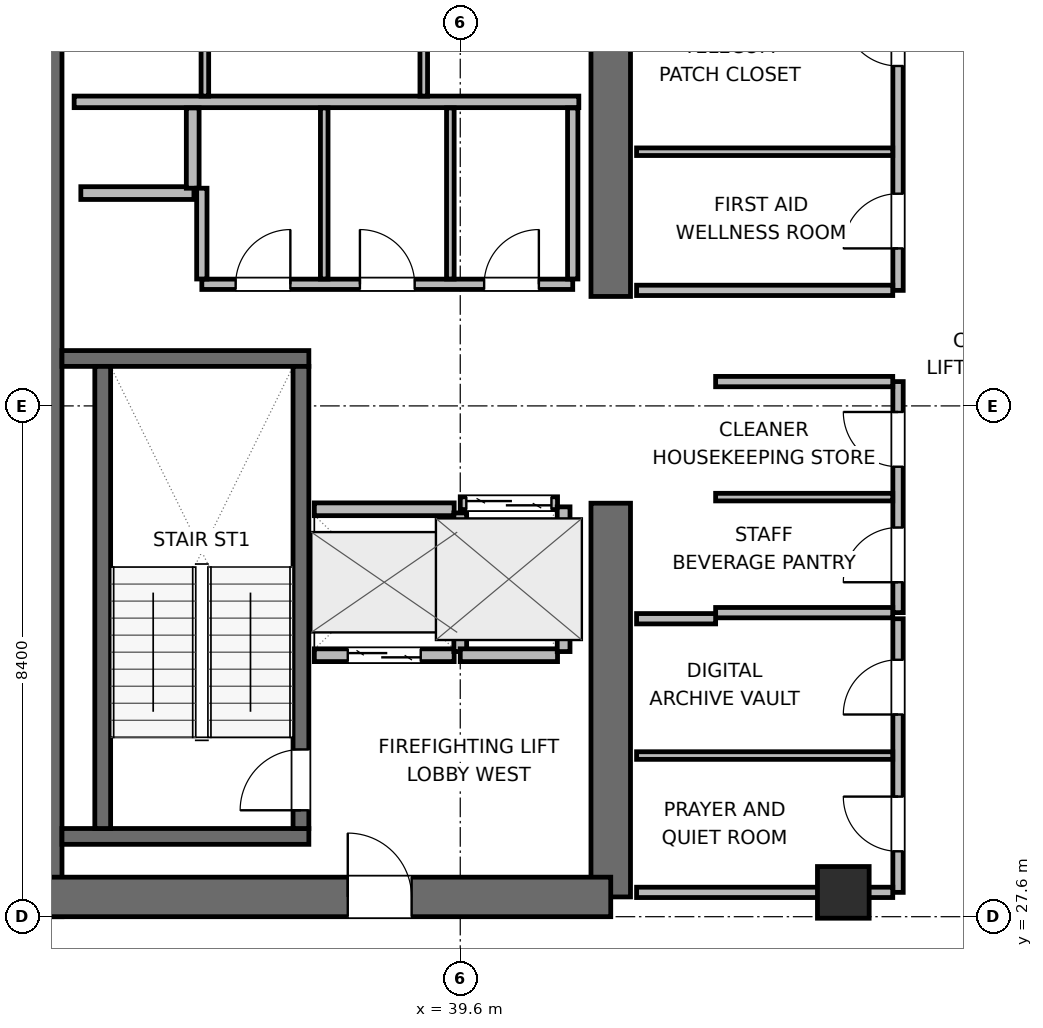
"""IFC4 building model, lengths in metres.
Left out: names, types, materials, properties, quantities, classifications, styles, units other than length and angle.
Written with IfcOpenShell. Run it as: python <this file> out.ifc"""

import sys

from ifc_helpers import new_model, si_unit, direction, frame, frame_2d, origin, origin_2d, place, context, subcontext, project, spatial, rectangle, extrude, element, fill, save


model = new_model("IFC4")
c1 = context("Model", 3, precision=1e-05, world=origin(), true_north=direction((0.0, 1.0)))
c2 = subcontext(c1, "Body", "Model", "MODEL_VIEW")
j1 = project(units=[si_unit("LENGTHUNIT", "METRE"), si_unit("PLANEANGLEUNIT", "RADIAN")], contexts=[c1])
p1 = place(None, origin())
s1 = spatial("IfcSite", under=j1, at=p1, CompositionType="ELEMENT")
p2 = place(p1, origin())
s2 = spatial("IfcBuilding", under=s1, at=p2, CompositionType="ELEMENT")
p3 = place(p2, frame((0.0, 0.0, 251.1)))
s3 = spatial("IfcBuildingStorey", under=s2, at=p3, CompositionType="ELEMENT", Elevation=251.1)
p4 = place(p3, frame((32.725, 27.6, 0.0), z_axis=(0.0, 0.0, 1.0), x_axis=(0.0, 1.0, 0.0)))
e1 = element("IfcWall", 1, at=p4, inside=s3, PredefinedType="SHEAR", context=c2, shape_type="SweptSolid", body=[
    extrude(rectangle(XDim=16.8, YDim=0.65, at=frame_2d((8.4, 0.0))), origin(), (0.0, 0.0, 1.0), 3.9),
])
p5 = place(p3, frame((42.075, 27.925, 0.0), z_axis=(0.0, 0.0, 1.0), x_axis=(0.0, 1.0, 0.0)))
e2 = element("IfcWall", 2, at=p5, inside=s3, PredefinedType="SHEAR", context=c2, shape_type="SweptSolid", body=[
    extrude(rectangle(XDim=6.475, YDim=0.65, at=frame_2d((3.237, 0.0))), origin(), (0.0, 0.0, 1.0), 3.9),
])
p6 = place(p3, frame((42.075, 37.8, 0.0), z_axis=(0.0, 0.0, 1.0), x_axis=(0.0, 1.0, 0.0)))
e3 = element("IfcWall", 3, at=p6, inside=s3, PredefinedType="SHEAR", context=c2, shape_type="SweptSolid", body=[
    extrude(rectangle(XDim=6.275, YDim=0.65, at=frame_2d((3.137, 0.0))), origin(), (0.0, 0.0, 1.0), 3.9),
])
p7 = place(p3, frame((32.725, 27.925, 0.0), z_axis=(0.0, 0.0, 1.0), x_axis=(1.0, 0.0, 0.0)))
e4 = element("IfcWall", 4, at=p7, inside=s3, PredefinedType="SHEAR", context=c2, shape_type="SweptSolid", body=[
    extrude(rectangle(XDim=9.35, YDim=0.65, at=frame_2d((4.675, 0.0))), origin(), (0.0, 0.0, 1.0), 3.9),
])
p8 = place(p7, frame((5.025, 0.0, 0.0)))
e5 = element("IfcOpeningElement", 5, at=p8, cuts=e4, PredefinedType="OPENING", context=c2, shape_type="SweptSolid", body=[
    extrude(rectangle(XDim=1.05, YDim=2.04, at=frame_2d((0.525, 1.02))), frame((0.0, 0.335, 0.0), z_axis=(0.0, -1.0, 0.0), x_axis=(1.0, 0.0, 0.0)), (0.0, 0.0, 1.0), 0.67),
])
for number, where, z_axis, x_axis in (
    (6, (33.05, 28.92, 0.0), (0.0, 0.0, 1.0), (1.0, 0.0, 0.0)),
    (7, (33.05, 36.78, 0.0), (0.0, 0.0, 1.0), (1.0, 0.0, 0.0)),
):
    element("IfcWall", number, at=place(p3, frame(where, z_axis=z_axis, x_axis=x_axis)), inside=s3, PredefinedType="SHEAR", context=c2, shape_type="SweptSolid", body=[
        extrude(rectangle(XDim=4.06, YDim=0.26, at=frame_2d((2.03, 0.0))), origin(), (0.0, 0.0, 1.0), 3.9),
    ])
p9 = place(p3, frame((33.72, 29.05, 0.0), z_axis=(0.0, 0.0, 1.0), x_axis=(0.0, 1.0, 0.0)))
e8 = element("IfcWall", 8, at=p9, inside=s3, PredefinedType="SHEAR", context=c2, shape_type="SweptSolid", body=[
    extrude(rectangle(XDim=7.6, YDim=0.26, at=frame_2d((3.8, 0.0))), origin(), (0.0, 0.0, 1.0), 3.9),
])
p10 = place(p3, frame((36.98, 29.05, 0.0), z_axis=(0.0, 0.0, 1.0), x_axis=(0.0, 1.0, 0.0)))
e9 = element("IfcWall", 9, at=p10, inside=s3, PredefinedType="SHEAR", context=c2, shape_type="SweptSolid", body=[
    extrude(rectangle(XDim=7.6, YDim=0.26, at=frame_2d((3.8, 0.0))), origin(), (0.0, 0.0, 1.0), 3.9),
])
p11 = place(p10, frame((0.3, 0.0, 0.0)))
e10 = element("IfcOpeningElement", 10, at=p11, cuts=e9, PredefinedType="OPENING", context=c2, shape_type="SweptSolid", body=[
    extrude(rectangle(XDim=1.0, YDim=2.04, at=frame_2d((0.5, 1.02))), frame((0.0, 0.14, 0.0), z_axis=(0.0, -1.0, 0.0), x_axis=(1.0, 0.0, 0.0)), (0.0, 0.0, 1.0), 0.28),
])
p12 = place(p3, frame((45.9, 28.0, 0.0), z_axis=(0.0, 0.0, 1.0), x_axis=(1.0, 0.0, 0.0)))
e11 = element("IfcColumn", 11, at=p12, inside=s3, PredefinedType="COLUMN", context=c2, shape_type="SweptSolid", body=[
    extrude(rectangle(XDim=0.85, YDim=0.85, at=origin_2d()), origin(), (0.0, 0.0, 1.0), 3.9),
])
p13 = place(p3, frame((33.25, 41.0, 0.0), z_axis=(0.0, 0.0, 1.0), x_axis=(1.0, 0.0, 0.0)))
e12 = element("IfcWall", 12, at=p13, inside=s3, PredefinedType="PLUMBINGWALL", context=c2, shape_type="SweptSolid", body=[
    extrude(rectangle(XDim=8.3, YDim=0.19, at=frame_2d((4.15, 0.0))), origin(), (0.0, 0.0, 1.0), 3.68),
])
for number, where, z_axis, x_axis in (
    (13, (35.4, 41.095, 0.0), (0.0, 0.0, 1.0), (0.0, 1.0, 0.0)),
    (14, (39.0, 41.095, 0.0), (0.0, 0.0, 1.0), (0.0, 1.0, 0.0)),
):
    element("IfcWall", number, at=place(p3, frame(where, z_axis=z_axis, x_axis=x_axis)), inside=s3, PredefinedType="PARTITIONING", context=c2, shape_type="SweptSolid", body=[
        extrude(rectangle(XDim=2.455, YDim=0.125, at=frame_2d((1.228, 0.0))), origin(), (0.0, 0.0, 1.0), 3.68),
    ])
p14 = place(p3, frame((33.36, 39.5, 0.0), z_axis=(0.0, 0.0, 1.0), x_axis=(1.0, 0.0, 0.0)))
e15 = element("IfcWall", 15, at=p14, inside=s3, PredefinedType="PARTITIONING", context=c2, shape_type="SweptSolid", body=[
    extrude(rectangle(XDim=1.86, YDim=0.21, at=frame_2d((0.93, 0.0))), origin(), (0.0, 0.0, 1.0), 3.68),
])
p15 = place(p3, frame((35.2, 39.58, 0.0), z_axis=(0.0, 0.0, 1.0), x_axis=(0.0, 1.0, 0.0)))
e16 = element("IfcWall", 16, at=p15, inside=s3, PredefinedType="PARTITIONING", context=c2, shape_type="SweptSolid", body=[
    extrude(rectangle(XDim=1.32, YDim=0.21, at=frame_2d((0.66, 0.0))), origin(), (0.0, 0.0, 1.0), 3.68),
])
p16 = place(p3, frame((37.2, 31.9, 0.0), z_axis=(0.0, 0.0, 1.0), x_axis=(1.0, 0.0, 0.0)))
e17 = element("IfcWall", 17, at=p16, inside=s3, PredefinedType="PARTITIONING", context=c2, shape_type="SweptSolid", body=[
    extrude(rectangle(XDim=2.3, YDim=0.21, at=frame_2d((1.15, 0.0))), origin(), (0.0, 0.0, 1.0), 3.68),
])
p17 = place(p16, frame((0.55, 0.0, 0.0)))
e18 = element("IfcOpeningElement", 18, at=p17, cuts=e17, PredefinedType="OPENING", context=c2, shape_type="SweptSolid", body=[
    extrude(rectangle(XDim=1.2, YDim=2.04, at=frame_2d((0.6, 1.02))), frame((0.0, 0.115, 0.0), z_axis=(0.0, -1.0, 0.0), x_axis=(1.0, 0.0, 0.0)), (0.0, 0.0, 1.0), 0.23),
])
p18 = place(p3, frame((37.2, 34.3, 0.0), z_axis=(0.0, 0.0, 1.0), x_axis=(1.0, 0.0, 0.0)))
e19 = element("IfcWall", 19, at=p18, inside=s3, PredefinedType="PARTITIONING", context=c2, shape_type="SweptSolid", body=[
    extrude(rectangle(XDim=2.3, YDim=0.21, at=frame_2d((1.15, 0.0))), origin(), (0.0, 0.0, 1.0), 3.68),
])
p19 = place(p3, frame((39.6, 31.96, 0.0), z_axis=(0.0, 0.0, 1.0), x_axis=(0.0, 1.0, 0.0)))
e20 = element("IfcWall", 20, at=p19, inside=s3, PredefinedType="PARTITIONING", context=c2, shape_type="SweptSolid", body=[
    extrude(rectangle(XDim=2.28, YDim=0.21, at=frame_2d((1.14, 0.0))), origin(), (0.0, 0.0, 1.0), 3.68),
])
p20 = place(p3, frame((39.6, 34.4, 0.0), z_axis=(0.0, 0.0, 1.0), x_axis=(1.0, 0.0, 0.0)))
e21 = element("IfcWall", 21, at=p20, inside=s3, PredefinedType="PARTITIONING", context=c2, shape_type="SweptSolid", body=[
    extrude(rectangle(XDim=1.6, YDim=0.21, at=frame_2d((0.8, 0.0))), origin(), (0.0, 0.0, 1.0), 3.68),
])
p21 = place(p20, frame((0.1, 0.0, 0.0)))
e22 = element("IfcOpeningElement", 22, at=p21, cuts=e21, PredefinedType="OPENING", context=c2, shape_type="SweptSolid", body=[
    extrude(rectangle(XDim=1.4, YDim=2.06, at=frame_2d((0.7, 1.03))), frame((0.0, 0.115, 0.0), z_axis=(0.0, -1.0, 0.0), x_axis=(1.0, 0.0, 0.0)), (0.0, 0.0, 1.0), 0.23),
])
p22 = place(p3, frame((39.6, 31.9, 0.0), z_axis=(0.0, 0.0, 1.0), x_axis=(1.0, 0.0, 0.0)))
e23 = element("IfcWall", 23, at=p22, inside=s3, PredefinedType="PARTITIONING", context=c2, shape_type="SweptSolid", body=[
    extrude(rectangle(XDim=1.6, YDim=0.21, at=frame_2d((0.8, 0.0))), origin(), (0.0, 0.0, 1.0), 3.68),
])
p23 = place(p3, frame((41.3, 31.96, 0.0), z_axis=(0.0, 0.0, 1.0), x_axis=(0.0, 1.0, 0.0)))
e24 = element("IfcWall", 24, at=p23, inside=s3, PredefinedType="PARTITIONING", context=c2, shape_type="SweptSolid", body=[
    extrude(rectangle(XDim=2.38, YDim=0.21, at=frame_2d((1.19, 0.0))), origin(), (0.0, 0.0, 1.0), 3.68),
])
p24 = place(p3, frame((35.35, 38.0, 0.0), z_axis=(0.0, 0.0, 1.0), x_axis=(1.0, 0.0, 0.0)))
e25 = element("IfcWall", 25, at=p24, inside=s3, PredefinedType="PARTITIONING", context=c2, shape_type="SweptSolid", body=[
    extrude(rectangle(XDim=6.1, YDim=0.17, at=frame_2d((3.05, 0.0))), origin(), (0.0, 0.0, 1.0), 3.68),
])
p25 = place(p24, frame((0.556, 0.0, 0.0)))
e26 = element("IfcOpeningElement", 26, at=p25, cuts=e25, PredefinedType="OPENING", context=c2, shape_type="SweptSolid", body=[
    extrude(rectangle(XDim=0.9, YDim=2.02, at=frame_2d((0.45, 1.01))), frame((0.0, 0.095, 0.0), z_axis=(0.0, -1.0, 0.0), x_axis=(1.0, 0.0, 0.0)), (0.0, 0.0, 1.0), 0.19),
])
p26 = place(p24, frame((2.6, 0.0, 0.0)))
e27 = element("IfcOpeningElement", 27, at=p26, cuts=e25, PredefinedType="OPENING", context=c2, shape_type="SweptSolid", body=[
    extrude(rectangle(XDim=0.9, YDim=2.02, at=frame_2d((0.45, 1.01))), frame((0.0, 0.095, 0.0), z_axis=(0.0, -1.0, 0.0), x_axis=(1.0, 0.0, 0.0)), (0.0, 0.0, 1.0), 0.19),
])
p27 = place(p24, frame((4.643, 0.0, 0.0)))
e28 = element("IfcOpeningElement", 28, at=p27, cuts=e25, PredefinedType="OPENING", context=c2, shape_type="SweptSolid", body=[
    extrude(rectangle(XDim=0.9, YDim=2.02, at=frame_2d((0.45, 1.01))), frame((0.0, 0.095, 0.0), z_axis=(0.0, -1.0, 0.0), x_axis=(1.0, 0.0, 0.0)), (0.0, 0.0, 1.0), 0.19),
])
p28 = place(p3, frame((35.35, 38.087, 0.0), z_axis=(0.0, 0.0, 1.0), x_axis=(0.0, 1.0, 0.0)))
e29 = element("IfcWall", 29, at=p28, inside=s3, PredefinedType="PARTITIONING", context=c2, shape_type="SweptSolid", body=[
    extrude(rectangle(XDim=1.493, YDim=0.17, at=frame_2d((0.747, 0.0))), origin(), (0.0, 0.0, 1.0), 3.68),
])
p29 = place(p3, frame((41.45, 38.087, 0.0), z_axis=(0.0, 0.0, 1.0), x_axis=(0.0, 1.0, 0.0)))
e30 = element("IfcWall", 30, at=p29, inside=s3, PredefinedType="PARTITIONING", context=c2, shape_type="SweptSolid", body=[
    extrude(rectangle(XDim=2.813, YDim=0.17, at=frame_2d((1.406, 0.0))), origin(), (0.0, 0.0, 1.0), 3.68),
])
for number, where, z_axis, x_axis in (
    (31, (37.363, 38.087, 0.0), (0.0, 0.0, 1.0), (0.0, 1.0, 0.0)),
    (32, (39.437, 38.087, 0.0), (0.0, 0.0, 1.0), (0.0, 1.0, 0.0)),
):
    element("IfcWall", number, at=place(p3, frame(where, z_axis=z_axis, x_axis=x_axis)), inside=s3, PredefinedType="PARTITIONING", context=c2, shape_type="SweptSolid", body=[
        extrude(rectangle(XDim=2.813, YDim=0.125, at=frame_2d((1.406, 0.0))), origin(), (0.0, 0.0, 1.0), 3.68),
    ])
p30 = place(p3, frame((46.8, 32.6, 0.0), z_axis=(0.0, 0.0, 1.0), x_axis=(0.0, 1.0, 0.0)))
e33 = element("IfcWall", 33, at=p30, inside=s3, PredefinedType="PARTITIONING", context=c2, shape_type="SweptSolid", body=[
    extrude(rectangle(XDim=3.8, YDim=0.17, at=frame_2d((1.9, 0.0))), origin(), (0.0, 0.0, 1.0), 3.68),
])
p31 = place(p30, frame((0.5, 0.0, 0.0)))
e34 = element("IfcOpeningElement", 34, at=p31, cuts=e33, PredefinedType="OPENING", context=c2, shape_type="SweptSolid", body=[
    extrude(rectangle(XDim=0.9, YDim=2.02, at=frame_2d((0.45, 1.01))), frame((0.0, 0.095, 0.0), z_axis=(0.0, -1.0, 0.0), x_axis=(1.0, 0.0, 0.0)), (0.0, 0.0, 1.0), 0.19),
])
p32 = place(p30, frame((2.4, 0.0, 0.0)))
e35 = element("IfcOpeningElement", 35, at=p32, cuts=e33, PredefinedType="OPENING", context=c2, shape_type="SweptSolid", body=[
    extrude(rectangle(XDim=0.9, YDim=2.02, at=frame_2d((0.45, 1.01))), frame((0.0, 0.095, 0.0), z_axis=(0.0, -1.0, 0.0), x_axis=(1.0, 0.0, 0.0)), (0.0, 0.0, 1.0), 0.19),
])
for number, where, z_axis, x_axis in (
    (36, (43.8, 32.6, 0.0), (0.0, 0.0, 1.0), (1.0, 0.0, 0.0)),
    (37, (43.8, 36.4, 0.0), (0.0, 0.0, 1.0), (1.0, 0.0, 0.0)),
):
    element("IfcWall", number, at=place(p3, frame(where, z_axis=z_axis, x_axis=x_axis)), inside=s3, PredefinedType="PARTITIONING", context=c2, shape_type="SweptSolid", body=[
        extrude(rectangle(XDim=2.913, YDim=0.17, at=frame_2d((1.457, 0.0))), origin(), (0.0, 0.0, 1.0), 3.68),
    ])
p33 = place(p3, frame((43.8, 34.5, 0.0), z_axis=(0.0, 0.0, 1.0), x_axis=(1.0, 0.0, 0.0)))
e38 = element("IfcWall", 38, at=p33, inside=s3, PredefinedType="PARTITIONING", context=c2, shape_type="SweptSolid", body=[
    extrude(rectangle(XDim=2.913, YDim=0.125, at=frame_2d((1.457, 0.0))), origin(), (0.0, 0.0, 1.0), 3.68),
])
p34 = place(p3, frame((46.8, 28.0, 0.0), z_axis=(0.0, 0.0, 1.0), x_axis=(0.0, 1.0, 0.0)))
e39 = element("IfcWall", 39, at=p34, inside=s3, PredefinedType="PARTITIONING", context=c2, shape_type="SweptSolid", body=[
    extrude(rectangle(XDim=4.5, YDim=0.17, at=frame_2d((2.25, 0.0))), origin(), (0.0, 0.0, 1.0), 3.68),
])
p35 = place(p34, frame((0.675, 0.0, 0.0)))
e40 = element("IfcOpeningElement", 40, at=p35, cuts=e39, PredefinedType="OPENING", context=c2, shape_type="SweptSolid", body=[
    extrude(rectangle(XDim=0.9, YDim=2.02, at=frame_2d((0.45, 1.01))), frame((0.0, 0.095, 0.0), z_axis=(0.0, -1.0, 0.0), x_axis=(1.0, 0.0, 0.0)), (0.0, 0.0, 1.0), 0.19),
])
p36 = place(p34, frame((2.925, 0.0, 0.0)))
e41 = element("IfcOpeningElement", 41, at=p36, cuts=e39, PredefinedType="OPENING", context=c2, shape_type="SweptSolid", body=[
    extrude(rectangle(XDim=0.9, YDim=2.02, at=frame_2d((0.45, 1.01))), frame((0.0, 0.095, 0.0), z_axis=(0.0, -1.0, 0.0), x_axis=(1.0, 0.0, 0.0)), (0.0, 0.0, 1.0), 0.19),
])
p37 = place(p3, frame((42.5, 28.0, 0.0), z_axis=(0.0, 0.0, 1.0), x_axis=(1.0, 0.0, 0.0)))
e42 = element("IfcWall", 42, at=p37, inside=s3, PredefinedType="PARTITIONING", context=c2, shape_type="SweptSolid", body=[
    extrude(rectangle(XDim=4.213, YDim=0.17, at=frame_2d((2.106, 0.0))), origin(), (0.0, 0.0, 1.0), 2.765),
])
p38 = place(p3, frame((42.5, 32.5, 0.0), z_axis=(0.0, 0.0, 1.0), x_axis=(1.0, 0.0, 0.0)))
e43 = element("IfcWall", 43, at=p38, inside=s3, PredefinedType="PARTITIONING", context=c2, shape_type="SweptSolid", body=[
    extrude(rectangle(XDim=1.3, YDim=0.17, at=frame_2d((0.65, 0.0))), origin(), (0.0, 0.0, 1.0), 3.68),
])
p39 = place(p3, frame((42.5, 30.25, 0.0), z_axis=(0.0, 0.0, 1.0), x_axis=(1.0, 0.0, 0.0)))
e44 = element("IfcWall", 44, at=p39, inside=s3, PredefinedType="PARTITIONING", context=c2, shape_type="SweptSolid", body=[
    extrude(rectangle(XDim=4.213, YDim=0.125, at=frame_2d((2.106, 0.0))), origin(), (0.0, 0.0, 1.0), 3.68),
])
p40 = place(p3, frame((46.8, 37.9, 0.0), z_axis=(0.0, 0.0, 1.0), x_axis=(0.0, 1.0, 0.0)))
e45 = element("IfcWall", 45, at=p40, inside=s3, PredefinedType="PARTITIONING", context=c2, shape_type="SweptSolid", body=[
    extrude(rectangle(XDim=6.0, YDim=0.17, at=frame_2d((3.0, 0.0))), origin(), (0.0, 0.0, 1.0), 3.68),
])
p41 = place(p40, frame((0.69, 0.0, 0.0)))
e46 = element("IfcOpeningElement", 46, at=p41, cuts=e45, PredefinedType="OPENING", context=c2, shape_type="SweptSolid", body=[
    extrude(rectangle(XDim=0.9, YDim=2.02, at=frame_2d((0.45, 1.01))), frame((0.0, 0.095, 0.0), z_axis=(0.0, -1.0, 0.0), x_axis=(1.0, 0.0, 0.0)), (0.0, 0.0, 1.0), 0.19),
])
p42 = place(p40, frame((3.69, 0.0, 0.0)))
e47 = element("IfcOpeningElement", 47, at=p42, cuts=e45, PredefinedType="OPENING", context=c2, shape_type="SweptSolid", body=[
    extrude(rectangle(XDim=0.9, YDim=2.02, at=frame_2d((0.45, 1.01))), frame((0.0, 0.095, 0.0), z_axis=(0.0, -1.0, 0.0), x_axis=(1.0, 0.0, 0.0)), (0.0, 0.0, 1.0), 0.19),
])
p43 = place(p3, frame((42.5, 37.9, 0.0), z_axis=(0.0, 0.0, 1.0), x_axis=(1.0, 0.0, 0.0)))
e48 = element("IfcWall", 48, at=p43, inside=s3, PredefinedType="PARTITIONING", context=c2, shape_type="SweptSolid", body=[
    extrude(rectangle(XDim=4.213, YDim=0.17, at=frame_2d((2.106, 0.0))), origin(), (0.0, 0.0, 1.0), 3.68),
])
p44 = place(p3, frame((42.5, 40.18, 0.0), z_axis=(0.0, 0.0, 1.0), x_axis=(1.0, 0.0, 0.0)))
e49 = element("IfcWall", 49, at=p44, inside=s3, PredefinedType="PARTITIONING", context=c2, shape_type="SweptSolid", body=[
    extrude(rectangle(XDim=4.213, YDim=0.125, at=frame_2d((2.106, 0.0))), origin(), (0.0, 0.0, 1.0), 3.68),
])
p45 = place(p11, origin())
e50 = element("IfcDoor", 50, at=p45, inside=s3, OperationType="SINGLE_SWING_LEFT", PredefinedType="DOOR", context=c2, shape_type="SweptSolid", body=[
    extrude(rectangle(XDim=1.0, YDim=2.04, at=frame_2d((0.5, 1.02))), frame((0.0, 0.025, 0.0), z_axis=(0.0, -1.0, 0.0), x_axis=(1.0, 0.0, 0.0)), (0.0, 0.0, 1.0), 0.05),
])
fill(e10, e50)
p46 = place(p17, origin())
e51 = element("IfcDoor", 51, at=p46, inside=s3, OperationType="DOUBLE_DOOR_SLIDING", PredefinedType="DOOR", context=c2, shape_type="SweptSolid", body=[
    extrude(rectangle(XDim=1.2, YDim=2.04, at=frame_2d((0.6, 1.02))), frame((0.0, 0.025, 0.0), z_axis=(0.0, -1.0, 0.0), x_axis=(1.0, 0.0, 0.0)), (0.0, 0.0, 1.0), 0.05),
])
fill(e18, e51)
p47 = place(p21, origin())
e52 = element("IfcDoor", 52, at=p47, inside=s3, OperationType="DOUBLE_DOOR_SLIDING", PredefinedType="DOOR", context=c2, shape_type="SweptSolid", body=[
    extrude(rectangle(XDim=1.4, YDim=2.06, at=frame_2d((0.7, 1.03))), frame((0.0, 0.025, 0.0), z_axis=(0.0, -1.0, 0.0), x_axis=(1.0, 0.0, 0.0)), (0.0, 0.0, 1.0), 0.05),
])
fill(e22, e52)
p48 = place(p8, origin())
e53 = element("IfcDoor", 53, at=p48, inside=s3, OperationType="SINGLE_SWING_LEFT", PredefinedType="DOOR", context=c2, shape_type="SweptSolid", body=[
    extrude(rectangle(XDim=1.05, YDim=2.04, at=frame_2d((0.525, 1.02))), frame((0.0, 0.025, 0.0), z_axis=(0.0, -1.0, 0.0), x_axis=(1.0, 0.0, 0.0)), (0.0, 0.0, 1.0), 0.05),
])
fill(e5, e53)
p49 = place(p25, origin())
e54 = element("IfcDoor", 54, at=p49, inside=s3, OperationType="SINGLE_SWING_RIGHT", PredefinedType="DOOR", context=c2, shape_type="SweptSolid", body=[
    extrude(rectangle(XDim=0.9, YDim=2.02, at=frame_2d((0.45, 1.01))), frame((0.0, 0.025, 0.0), z_axis=(0.0, -1.0, 0.0), x_axis=(1.0, 0.0, 0.0)), (0.0, 0.0, 1.0), 0.05),
])
fill(e26, e54)
p50 = place(p26, origin())
e55 = element("IfcDoor", 55, at=p50, inside=s3, OperationType="SINGLE_SWING_LEFT", PredefinedType="DOOR", context=c2, shape_type="SweptSolid", body=[
    extrude(rectangle(XDim=0.9, YDim=2.02, at=frame_2d((0.45, 1.01))), frame((0.0, 0.025, 0.0), z_axis=(0.0, -1.0, 0.0), x_axis=(1.0, 0.0, 0.0)), (0.0, 0.0, 1.0), 0.05),
])
fill(e27, e55)
p51 = place(p27, origin())
e56 = element("IfcDoor", 56, at=p51, inside=s3, OperationType="SINGLE_SWING_RIGHT", PredefinedType="DOOR", context=c2, shape_type="SweptSolid", body=[
    extrude(rectangle(XDim=0.9, YDim=2.02, at=frame_2d((0.45, 1.01))), frame((0.0, 0.025, 0.0), z_axis=(0.0, -1.0, 0.0), x_axis=(1.0, 0.0, 0.0)), (0.0, 0.0, 1.0), 0.05),
])
fill(e28, e56)
p52 = place(p31, origin())
e57 = element("IfcDoor", 57, at=p52, inside=s3, OperationType="SINGLE_SWING_LEFT", PredefinedType="DOOR", context=c2, shape_type="SweptSolid", body=[
    extrude(rectangle(XDim=0.9, YDim=2.02, at=frame_2d((0.45, 1.01))), frame((0.0, 0.025, 0.0), z_axis=(0.0, -1.0, 0.0), x_axis=(1.0, 0.0, 0.0)), (0.0, 0.0, 1.0), 0.05),
])
fill(e34, e57)
p53 = place(p32, origin())
e58 = element("IfcDoor", 58, at=p53, inside=s3, OperationType="SINGLE_SWING_RIGHT", PredefinedType="DOOR", context=c2, shape_type="SweptSolid", body=[
    extrude(rectangle(XDim=0.9, YDim=2.02, at=frame_2d((0.45, 1.01))), frame((0.0, 0.025, 0.0), z_axis=(0.0, -1.0, 0.0), x_axis=(1.0, 0.0, 0.0)), (0.0, 0.0, 1.0), 0.05),
])
fill(e35, e58)
p54 = place(p35, origin())
e59 = element("IfcDoor", 59, at=p54, inside=s3, OperationType="SINGLE_SWING_RIGHT", PredefinedType="DOOR", context=c2, shape_type="SweptSolid", body=[
    extrude(rectangle(XDim=0.9, YDim=2.02, at=frame_2d((0.45, 1.01))), frame((0.0, 0.025, 0.0), z_axis=(0.0, -1.0, 0.0), x_axis=(1.0, 0.0, 0.0)), (0.0, 0.0, 1.0), 0.05),
])
fill(e40, e59)
p55 = place(p36, origin())
e60 = element("IfcDoor", 60, at=p55, inside=s3, OperationType="SINGLE_SWING_LEFT", PredefinedType="DOOR", context=c2, shape_type="SweptSolid", body=[
    extrude(rectangle(XDim=0.9, YDim=2.02, at=frame_2d((0.45, 1.01))), frame((0.0, 0.025, 0.0), z_axis=(0.0, -1.0, 0.0), x_axis=(1.0, 0.0, 0.0)), (0.0, 0.0, 1.0), 0.05),
])
fill(e41, e60)
p56 = place(p41, origin())
e61 = element("IfcDoor", 61, at=p56, inside=s3, OperationType="SINGLE_SWING_LEFT", PredefinedType="DOOR", context=c2, shape_type="SweptSolid", body=[
    extrude(rectangle(XDim=0.9, YDim=2.02, at=frame_2d((0.45, 1.01))), frame((0.0, 0.025, 0.0), z_axis=(0.0, -1.0, 0.0), x_axis=(1.0, 0.0, 0.0)), (0.0, 0.0, 1.0), 0.05),
])
fill(e46, e61)
p57 = place(p42, origin())
e62 = element("IfcDoor", 62, at=p57, inside=s3, OperationType="SINGLE_SWING_RIGHT", PredefinedType="DOOR", context=c2, shape_type="SweptSolid", body=[
    extrude(rectangle(XDim=0.9, YDim=2.02, at=frame_2d((0.45, 1.01))), frame((0.0, 0.025, 0.0), z_axis=(0.0, -1.0, 0.0), x_axis=(1.0, 0.0, 0.0)), (0.0, 0.0, 1.0), 0.05),
])
fill(e47, e62)
save(model, sys.argv[1])
